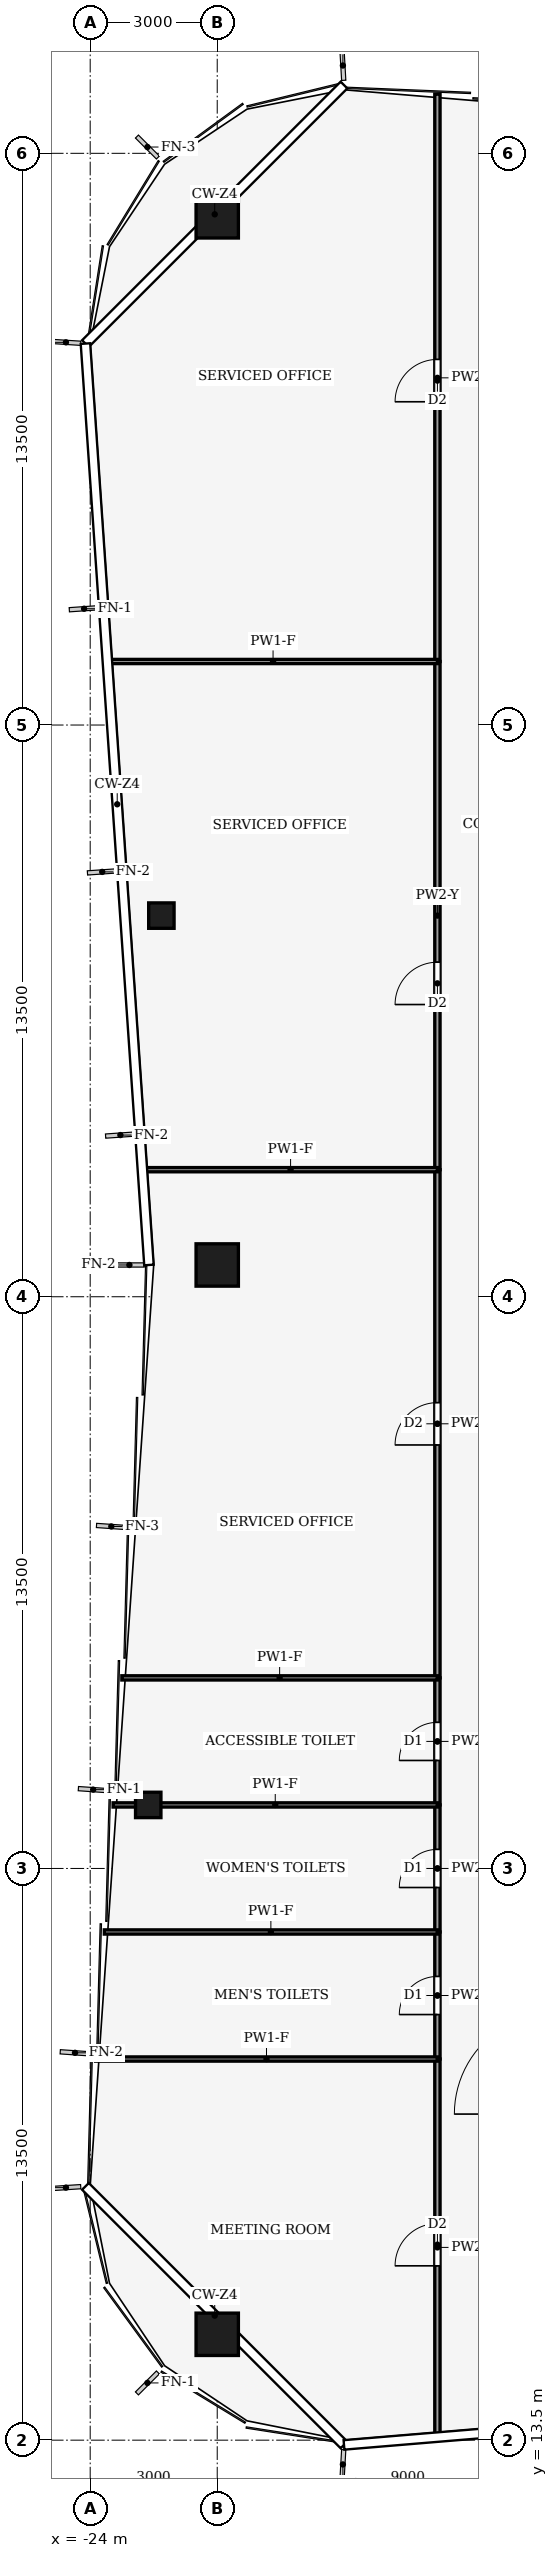
"""IFC4 building model, lengths in metres.
Left out: names, types, materials, properties, quantities, classifications, styles, units other than length and angle.
Written with IfcOpenShell. Run it as: python <this file> out.ifc"""

import sys

from ifc_helpers import new_model, si_unit, direction, frame, frame_2d, origin, origin_2d, place, context, subcontext, project, spatial, rectangle, hollow_rectangle, extrude, element, fill, save


model = new_model("IFC4")
c1 = context("Model", 3, precision=1e-05, world=origin(), true_north=direction((0.0, 1.0)))
c2 = subcontext(c1, "Body", "Model", "MODEL_VIEW")
j1 = project(units=[si_unit("LENGTHUNIT", "METRE"), si_unit("PLANEANGLEUNIT", "RADIAN")], contexts=[c1])
p1 = place(None, origin())
s1 = spatial("IfcSite", under=j1, at=p1, CompositionType="ELEMENT")
p2 = place(p1, origin())
s2 = spatial("IfcBuilding", under=s1, at=p2, CompositionType="ELEMENT")
p3 = place(p2, frame((0.0, 0.0, 274.0)))
s3 = spatial("IfcBuildingStorey", under=s2, at=p3, CompositionType="ELEMENT", Elevation=274.0)
for number, where, z_axis, x_axis in (
    (1, (-21.0, 66.0, 0.0), (0.0, 0.0, 1.0), (1.0, 0.0, 0.0)),
    (2, (-21.0, 16.0, 0.0), (0.0, 0.0, 1.0), (1.0, 0.0, 0.0)),
    (3, (-21.0, 41.25, 0.0), (0.0, 0.0, 1.0), (1.0, 0.0, 0.0)),
):
    element("IfcColumn", number, at=place(p3, frame(where, z_axis=z_axis, x_axis=x_axis)), inside=s3, PredefinedType="COLUMN", context=c2, shape_type="SweptSolid", body=[
        extrude(hollow_rectangle(XDim=1.0, YDim=1.0, WallThickness=0.045, at=origin_2d()), origin(), (0.0, 0.0, 1.0), 4.0),
    ])
for number, where, z_axis, x_axis in (
    (4, (-22.629, 28.5, 0.0), (0.0, 0.0, 1.0), (1.0, 0.0, 0.0)),
    (5, (-22.319, 49.5, 0.0), (0.0, 0.0, 1.0), (1.0, 0.0, 0.0)),
):
    element("IfcColumn", number, at=place(p3, frame(where, z_axis=z_axis, x_axis=x_axis)), inside=s3, PredefinedType="COLUMN", context=c2, shape_type="SweptSolid", body=[
        extrude(hollow_rectangle(XDim=0.6, YDim=0.6, WallThickness=0.025, at=origin_2d()), origin(), (0.0, 0.0, 1.0), 4.0),
    ])
p4 = place(p3, frame((-15.8, 13.603, 0.0), z_axis=(0.0, 0.0, 1.0), x_axis=(0.0, 1.0, 0.0)))
e6 = element("IfcWall", 6, at=p4, inside=s3, PredefinedType="PARTITIONING", context=c2, shape_type="SweptSolid", body=[
    extrude(rectangle(XDim=8.897, YDim=0.125, at=frame_2d((4.448, 0.0))), origin(), (0.0, 0.0, 1.0), 3.04),
])
p5 = place(p4, frame((4.013, 0.0, 0.0)))
e7 = element("IfcOpeningElement", 7, at=p5, cuts=e6, PredefinedType="OPENING", context=c2, shape_type="SweptSolid", body=[
    extrude(rectangle(XDim=1.0, YDim=2.1, at=frame_2d((0.5, 1.05))), frame((0.0, 0.073, 0.0), z_axis=(0.0, -1.0, 0.0), x_axis=(1.0, 0.0, 0.0)), (0.0, 0.0, 1.0), 0.145),
])
p6 = place(p3, frame((-15.8, 22.5, 0.0), z_axis=(0.0, 0.0, 1.0), x_axis=(0.0, 1.0, 0.0)))
e8 = element("IfcWall", 8, at=p6, inside=s3, PredefinedType="PARTITIONING", context=c2, shape_type="SweptSolid", body=[
    extrude(rectangle(XDim=3.0, YDim=0.125, at=frame_2d((1.5, 0.0))), origin(), (0.0, 0.0, 1.0), 3.44),
])
p7 = place(p6, frame((1.05, 0.0, 0.0)))
e9 = element("IfcOpeningElement", 9, at=p7, cuts=e8, PredefinedType="OPENING", context=c2, shape_type="SweptSolid", body=[
    extrude(rectangle(XDim=0.9, YDim=2.1, at=frame_2d((0.45, 1.05))), frame((0.0, 0.073, 0.0), z_axis=(0.0, -1.0, 0.0), x_axis=(1.0, 0.0, 0.0)), (0.0, 0.0, 1.0), 0.145),
])
p8 = place(p3, frame((-15.8, 25.5, 0.0), z_axis=(0.0, 0.0, 1.0), x_axis=(0.0, 1.0, 0.0)))
e10 = element("IfcWall", 10, at=p8, inside=s3, PredefinedType="PARTITIONING", context=c2, shape_type="SweptSolid", body=[
    extrude(rectangle(XDim=3.0, YDim=0.125, at=frame_2d((1.5, 0.0))), origin(), (0.0, 0.0, 1.0), 3.87),
])
p9 = place(p8, frame((1.05, 0.0, 0.0)))
e11 = element("IfcOpeningElement", 11, at=p9, cuts=e10, PredefinedType="OPENING", context=c2, shape_type="SweptSolid", body=[
    extrude(rectangle(XDim=0.9, YDim=2.1, at=frame_2d((0.45, 1.05))), frame((0.0, 0.073, 0.0), z_axis=(0.0, -1.0, 0.0), x_axis=(1.0, 0.0, 0.0)), (0.0, 0.0, 1.0), 0.145),
])
p10 = place(p3, frame((-15.8, 28.5, 0.0), z_axis=(0.0, 0.0, 1.0), x_axis=(0.0, 1.0, 0.0)))
e12 = element("IfcWall", 12, at=p10, inside=s3, PredefinedType="PARTITIONING", context=c2, shape_type="SweptSolid", body=[
    extrude(rectangle(XDim=3.0, YDim=0.125, at=frame_2d((1.5, 0.0))), origin(), (0.0, 0.0, 1.0), 3.87),
])
p11 = place(p10, frame((1.05, 0.0, 0.0)))
e13 = element("IfcOpeningElement", 13, at=p11, cuts=e12, PredefinedType="OPENING", context=c2, shape_type="SweptSolid", body=[
    extrude(rectangle(XDim=0.9, YDim=2.1, at=frame_2d((0.45, 1.05))), frame((0.0, 0.073, 0.0), z_axis=(0.0, -1.0, 0.0), x_axis=(1.0, 0.0, 0.0)), (0.0, 0.0, 1.0), 0.145),
])
p12 = place(p3, frame((-15.8, 31.5, 0.0), z_axis=(0.0, 0.0, 1.0), x_axis=(0.0, 1.0, 0.0)))
e14 = element("IfcWall", 14, at=p12, inside=s3, PredefinedType="PARTITIONING", context=c2, shape_type="SweptSolid", body=[
    extrude(rectangle(XDim=12.0, YDim=0.125, at=frame_2d((6.0, 0.0))), origin(), (0.0, 0.0, 1.0), 3.14),
])
p13 = place(p12, frame((5.5, 0.0, 0.0)))
e15 = element("IfcOpeningElement", 15, at=p13, cuts=e14, PredefinedType="OPENING", context=c2, shape_type="SweptSolid", body=[
    extrude(rectangle(XDim=1.0, YDim=2.1, at=frame_2d((0.5, 1.05))), frame((0.0, 0.073, 0.0), z_axis=(0.0, -1.0, 0.0), x_axis=(1.0, 0.0, 0.0)), (0.0, 0.0, 1.0), 0.145),
])
p14 = place(p3, frame((-15.8, 43.5, 0.0), z_axis=(0.0, 0.0, 1.0), x_axis=(0.0, 1.0, 0.0)))
e16 = element("IfcWall", 16, at=p14, inside=s3, PredefinedType="PARTITIONING", context=c2, shape_type="SweptSolid", body=[
    extrude(rectangle(XDim=12.0, YDim=0.125, at=frame_2d((6.0, 0.0))), origin(), (0.0, 0.0, 1.0), 3.24),
])
p15 = place(p14, frame((3.9, 0.0, 0.0)))
e17 = element("IfcOpeningElement", 17, at=p15, cuts=e16, PredefinedType="OPENING", context=c2, shape_type="SweptSolid", body=[
    extrude(rectangle(XDim=1.0, YDim=2.1, at=frame_2d((0.5, 1.05))), frame((0.0, 0.073, 0.0), z_axis=(0.0, -1.0, 0.0), x_axis=(1.0, 0.0, 0.0)), (0.0, 0.0, 1.0), 0.145),
])
p16 = place(p3, frame((-15.8, 55.5, 0.0), z_axis=(0.0, 0.0, 1.0), x_axis=(0.0, 1.0, 0.0)))
e18 = element("IfcWall", 18, at=p16, inside=s3, PredefinedType="PARTITIONING", context=c2, shape_type="SweptSolid", body=[
    extrude(rectangle(XDim=13.397, YDim=0.125, at=frame_2d((6.698, 0.0))), origin(), (0.0, 0.0, 1.0), 3.04),
])
p17 = place(p16, frame((6.133, 0.0, 0.0)))
e19 = element("IfcOpeningElement", 19, at=p17, cuts=e18, PredefinedType="OPENING", context=c2, shape_type="SweptSolid", body=[
    extrude(rectangle(XDim=1.0, YDim=2.1, at=frame_2d((0.5, 1.05))), frame((0.0, 0.073, 0.0), z_axis=(0.0, -1.0, 0.0), x_axis=(1.0, 0.0, 0.0)), (0.0, 0.0, 1.0), 0.145),
])
p18 = place(p3, frame((-15.8, 22.5, 0.0), z_axis=(0.0, 0.0, 1.0), x_axis=(-1.0, 0.0, 0.0)))
e20 = element("IfcWall", 20, at=p18, inside=s3, PredefinedType="PARTITIONING", context=c2, shape_type="SweptSolid", body=[
    extrude(rectangle(XDim=8.073, YDim=0.1, at=frame_2d((4.037, 0.0))), origin(), (0.0, 0.0, 1.0), 3.04),
])
p19 = place(p3, frame((-15.8, 25.5, 0.0), z_axis=(0.0, 0.0, 1.0), x_axis=(-1.0, 0.0, 0.0)))
e21 = element("IfcWall", 21, at=p19, inside=s3, PredefinedType="PARTITIONING", context=c2, shape_type="SweptSolid", body=[
    extrude(rectangle(XDim=7.866, YDim=0.1, at=frame_2d((3.933, 0.0))), origin(), (0.0, 0.0, 1.0), 3.04),
])
p20 = place(p3, frame((-15.8, 28.5, 0.0), z_axis=(0.0, 0.0, 1.0), x_axis=(-1.0, 0.0, 0.0)))
e22 = element("IfcWall", 22, at=p20, inside=s3, PredefinedType="PARTITIONING", context=c2, shape_type="SweptSolid", body=[
    extrude(rectangle(XDim=7.659, YDim=0.1, at=frame_2d((3.83, 0.0))), origin(), (0.0, 0.0, 1.0), 3.04),
])
p21 = place(p3, frame((-15.8, 31.5, 0.0), z_axis=(0.0, 0.0, 1.0), x_axis=(-1.0, 0.0, 0.0)))
e23 = element("IfcWall", 23, at=p21, inside=s3, PredefinedType="PARTITIONING", context=c2, shape_type="SweptSolid", body=[
    extrude(rectangle(XDim=7.452, YDim=0.1, at=frame_2d((3.726, 0.0))), origin(), (0.0, 0.0, 1.0), 3.04),
])
p22 = place(p3, frame((-15.8, 43.5, 0.0), z_axis=(0.0, 0.0, 1.0), x_axis=(-1.0, 0.0, 0.0)))
e24 = element("IfcWall", 24, at=p22, inside=s3, PredefinedType="PARTITIONING", context=c2, shape_type="SweptSolid", body=[
    extrude(rectangle(XDim=6.935, YDim=0.1, at=frame_2d((3.468, 0.0))), origin(), (0.0, 0.0, 1.0), 3.04),
])
p23 = place(p3, frame((-15.8, 55.5, 0.0), z_axis=(0.0, 0.0, 1.0), x_axis=(-1.0, 0.0, 0.0)))
e25 = element("IfcWall", 25, at=p23, inside=s3, PredefinedType="PARTITIONING", context=c2, shape_type="SweptSolid", body=[
    extrude(rectangle(XDim=7.763, YDim=0.1, at=frame_2d((3.881, 0.0))), origin(), (0.0, 0.0, 1.0), 3.04),
])
p24 = place(p5, origin())
e26 = element("IfcDoor", 26, at=p24, inside=s3, OperationType="SINGLE_SWING_RIGHT", PredefinedType="DOOR", context=c2, shape_type="SweptSolid", body=[
    extrude(rectangle(XDim=1.0, YDim=2.1, at=frame_2d((0.5, 1.05))), frame((0.0, 0.025, 0.0), z_axis=(0.0, -1.0, 0.0), x_axis=(1.0, 0.0, 0.0)), (0.0, 0.0, 1.0), 0.05),
])
fill(e7, e26)
p25 = place(p7, origin())
e27 = element("IfcDoor", 27, at=p25, inside=s3, OperationType="SINGLE_SWING_RIGHT", PredefinedType="DOOR", context=c2, shape_type="SweptSolid", body=[
    extrude(rectangle(XDim=0.9, YDim=2.1, at=frame_2d((0.45, 1.05))), frame((0.0, 0.025, 0.0), z_axis=(0.0, -1.0, 0.0), x_axis=(1.0, 0.0, 0.0)), (0.0, 0.0, 1.0), 0.05),
])
fill(e9, e27)
p26 = place(p9, origin())
e28 = element("IfcDoor", 28, at=p26, inside=s3, OperationType="SINGLE_SWING_LEFT", PredefinedType="DOOR", context=c2, shape_type="SweptSolid", body=[
    extrude(rectangle(XDim=0.9, YDim=2.1, at=frame_2d((0.45, 1.05))), frame((0.0, 0.025, 0.0), z_axis=(0.0, -1.0, 0.0), x_axis=(1.0, 0.0, 0.0)), (0.0, 0.0, 1.0), 0.05),
])
fill(e11, e28)
p27 = place(p11, origin())
e29 = element("IfcDoor", 29, at=p27, inside=s3, OperationType="SINGLE_SWING_RIGHT", PredefinedType="DOOR", context=c2, shape_type="SweptSolid", body=[
    extrude(rectangle(XDim=0.9, YDim=2.1, at=frame_2d((0.45, 1.05))), frame((0.0, 0.025, 0.0), z_axis=(0.0, -1.0, 0.0), x_axis=(1.0, 0.0, 0.0)), (0.0, 0.0, 1.0), 0.05),
])
fill(e13, e29)
p28 = place(p13, origin())
e30 = element("IfcDoor", 30, at=p28, inside=s3, OperationType="SINGLE_SWING_LEFT", PredefinedType="DOOR", context=c2, shape_type="SweptSolid", body=[
    extrude(rectangle(XDim=1.0, YDim=2.1, at=frame_2d((0.5, 1.05))), frame((0.0, 0.025, 0.0), z_axis=(0.0, -1.0, 0.0), x_axis=(1.0, 0.0, 0.0)), (0.0, 0.0, 1.0), 0.05),
])
fill(e15, e30)
p29 = place(p15, origin())
e31 = element("IfcDoor", 31, at=p29, inside=s3, OperationType="SINGLE_SWING_LEFT", PredefinedType="DOOR", context=c2, shape_type="SweptSolid", body=[
    extrude(rectangle(XDim=1.0, YDim=2.1, at=frame_2d((0.5, 1.05))), frame((0.0, 0.025, 0.0), z_axis=(0.0, -1.0, 0.0), x_axis=(1.0, 0.0, 0.0)), (0.0, 0.0, 1.0), 0.05),
])
fill(e17, e31)
p30 = place(p17, origin())
e32 = element("IfcDoor", 32, at=p30, inside=s3, OperationType="SINGLE_SWING_LEFT", PredefinedType="DOOR", context=c2, shape_type="SweptSolid", body=[
    extrude(rectangle(XDim=1.0, YDim=2.1, at=frame_2d((0.5, 1.05))), frame((0.0, 0.025, 0.0), z_axis=(0.0, -1.0, 0.0), x_axis=(1.0, 0.0, 0.0)), (0.0, 0.0, 1.0), 0.05),
])
fill(e19, e32)
save(model, sys.argv[1])
